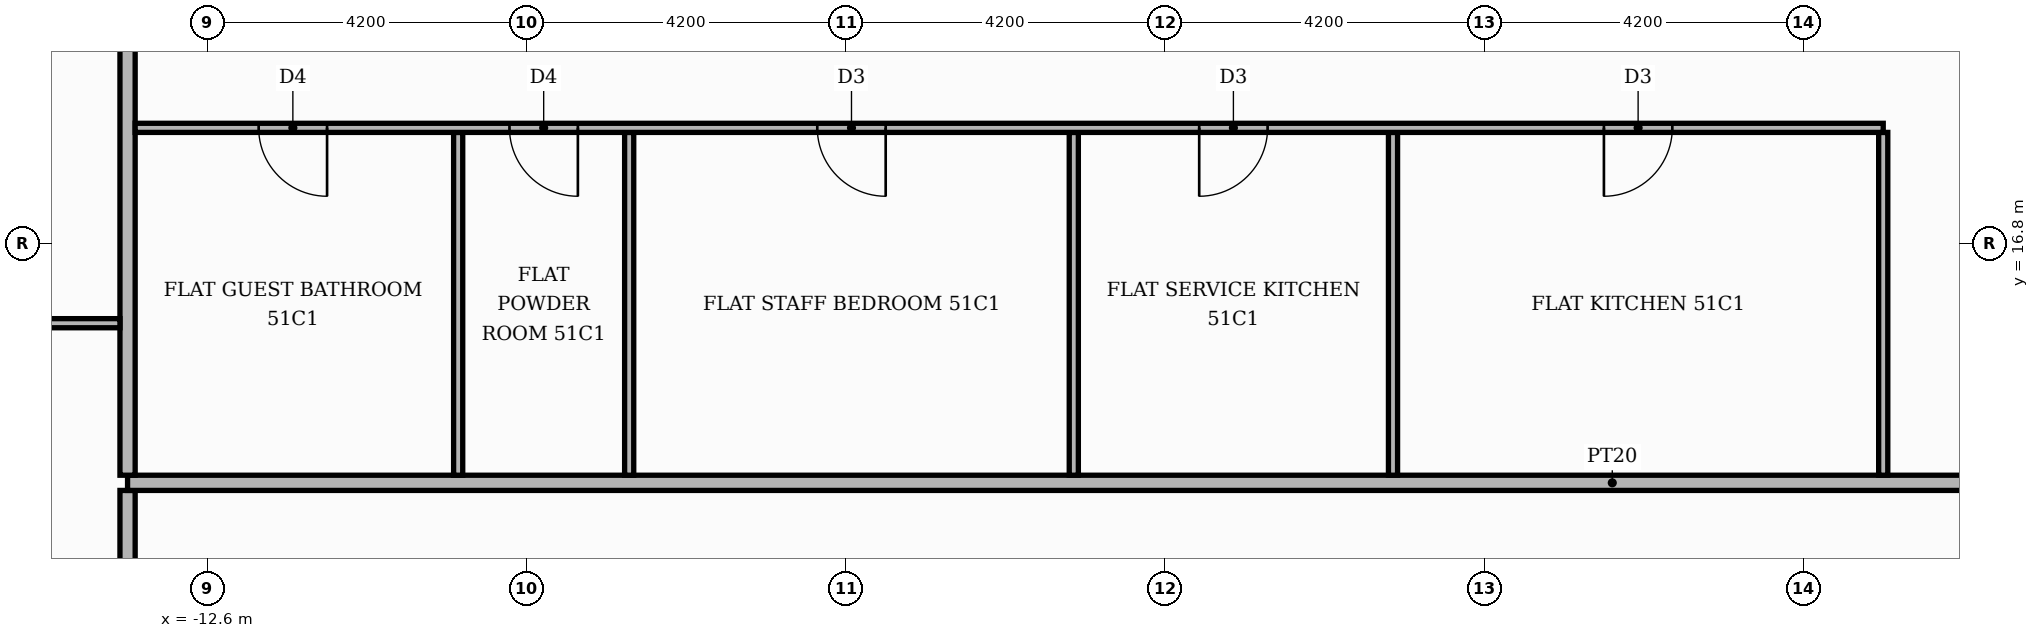
"""IFC4 building model, lengths in metres.
Left out: names, types, materials, properties, quantities, classifications, styles, units other than length and angle.
Written with IfcOpenShell. Run it as: python <this file> out.ifc"""

import sys

from ifc_helpers import new_model, si_unit, direction, frame, frame_2d, origin, place, context, subcontext, project, spatial, rectangle, extrude, element, fill, save


model = new_model("IFC4")
c1 = context("Model", 3, precision=1e-05, world=origin(), true_north=direction((0.0, 1.0)))
c2 = subcontext(c1, "Body", "Model", "MODEL_VIEW")
j1 = project(units=[si_unit("LENGTHUNIT", "METRE"), si_unit("PLANEANGLEUNIT", "RADIAN")], contexts=[c1])
p1 = place(None, origin())
s1 = spatial("IfcSite", under=j1, at=p1, CompositionType="ELEMENT")
p2 = place(p1, origin())
s2 = spatial("IfcBuilding", under=s1, at=p2, CompositionType="ELEMENT")
p3 = place(p2, frame((0.0, 0.0, 215.7)))
s3 = spatial("IfcBuildingStorey", under=s2, at=p3, CompositionType="ELEMENT", Elevation=215.7)
p4 = place(p3, frame((-13.65, 5.35, 0.0), z_axis=(0.0, 0.0, 1.0), x_axis=(0.0, 1.0, 0.0)))
e1 = element("IfcWall", 1, at=p4, inside=s3, PredefinedType="PARTITIONING", context=c2, shape_type="SweptSolid", body=[
    extrude(rectangle(XDim=8.2, YDim=0.2, at=frame_2d((4.1, 0.0))), origin(), (0.0, 0.0, 1.0), 3.48),
])
p5 = place(p4, frame((5.65, 0.0, 0.0)))
e2 = element("IfcOpeningElement", 2, at=p5, cuts=e1, PredefinedType="OPENING", context=c2, shape_type="SweptSolid", body=[
    extrude(rectangle(XDim=1.1, YDim=2.4, at=frame_2d((0.55, 1.2))), frame((0.0, 0.11, 0.0), z_axis=(0.0, -1.0, 0.0), x_axis=(1.0, 0.0, 0.0)), (0.0, 0.0, 1.0), 0.22),
])
p6 = place(p3, frame((-13.65, 13.65, 0.0), z_axis=(0.0, 0.0, 1.0), x_axis=(1.0, 0.0, 0.0)))
e3 = element("IfcWall", 3, at=p6, inside=s3, PredefinedType="PARTITIONING", context=c2, shape_type="SweptSolid", body=[
    extrude(rectangle(XDim=39.07, YDim=0.2, at=frame_2d((19.535, 0.0))), origin(), (0.0, 0.0, 1.0), 3.48),
])
p7 = place(p6, frame((24.65, 0.0, 0.0)))
e4 = element("IfcOpeningElement", 4, at=p7, cuts=e3, PredefinedType="OPENING", context=c2, shape_type="SweptSolid", body=[
    extrude(rectangle(XDim=1.1, YDim=2.4, at=frame_2d((0.55, 1.2))), frame((0.0, 0.11, 0.0), z_axis=(0.0, -1.0, 0.0), x_axis=(1.0, 0.0, 0.0)), (0.0, 0.0, 1.0), 0.22),
])
p8 = place(p3, frame((-13.65, 13.75, 0.0), z_axis=(0.0, 0.0, 1.0), x_axis=(0.0, 1.0, 0.0)))
e5 = element("IfcWall", 5, at=p8, inside=s3, PredefinedType="PARTITIONING", context=c2, shape_type="SweptSolid", body=[
    extrude(rectangle(XDim=11.67, YDim=0.2, at=frame_2d((5.835, 0.0))), origin(), (0.0, 0.0, 1.0), 3.48),
])
for number, where, z_axis, x_axis in (
    (6, (-9.3, 13.75, 0.0), (0.0, 0.0, 1.0), (0.0, 1.0, 0.0)),
    (7, (-7.05, 13.75, 0.0), (0.0, 0.0, 1.0), (0.0, 1.0, 0.0)),
    (8, (-1.2, 13.75, 0.0), (0.0, 0.0, 1.0), (0.0, 1.0, 0.0)),
    (9, (3.0, 13.75, 0.0), (0.0, 0.0, 1.0), (0.0, 1.0, 0.0)),
    (10, (9.45, 13.75, 0.0), (0.0, 0.0, 1.0), (0.0, 1.0, 0.0)),
):
    element("IfcWall", number, at=place(p3, frame(where, z_axis=z_axis, x_axis=x_axis)), inside=s3, PredefinedType="PARTITIONING", context=c2, shape_type="SweptSolid", body=[
        extrude(rectangle(XDim=4.51, YDim=0.12, at=frame_2d((2.255, 0.0))), origin(), (0.0, 0.0, 1.0), 3.48),
    ])
p9 = place(p3, frame((-20.12, 15.75, 0.0), z_axis=(0.0, 0.0, 1.0), x_axis=(1.0, 0.0, 0.0)))
e11 = element("IfcWall", 11, at=p9, inside=s3, PredefinedType="PARTITIONING", context=c2, shape_type="SweptSolid", body=[
    extrude(rectangle(XDim=6.37, YDim=0.12, at=frame_2d((3.185, 0.0))), origin(), (0.0, 0.0, 1.0), 3.48),
])
p10 = place(p9, frame((2.735, 0.0, 0.0)))
e12 = element("IfcOpeningElement", 12, at=p10, cuts=e11, PredefinedType="OPENING", context=c2, shape_type="SweptSolid", body=[
    extrude(rectangle(XDim=1.0, YDim=2.1, at=frame_2d((0.5, 1.05))), frame((0.0, 0.07, 0.0), z_axis=(0.0, -1.0, 0.0), x_axis=(1.0, 0.0, 0.0)), (0.0, 0.0, 1.0), 0.14),
])
p11 = place(p3, frame((-13.55, 18.32, 0.0), z_axis=(0.0, 0.0, 1.0), x_axis=(1.0, 0.0, 0.0)))
e13 = element("IfcWall", 13, at=p11, inside=s3, PredefinedType="PARTITIONING", context=c2, shape_type="SweptSolid", body=[
    extrude(rectangle(XDim=23.0, YDim=0.12, at=frame_2d((11.5, 0.0))), origin(), (0.0, 0.0, 1.0), 3.48),
])
p12 = place(p11, frame((19.325, 0.0, 0.0)))
e14 = element("IfcOpeningElement", 14, at=p12, cuts=e13, PredefinedType="OPENING", context=c2, shape_type="SweptSolid", body=[
    extrude(rectangle(XDim=0.9, YDim=2.1, at=frame_2d((0.45, 1.05))), frame((0.0, 0.07, 0.0), z_axis=(0.0, -1.0, 0.0), x_axis=(1.0, 0.0, 0.0)), (0.0, 0.0, 1.0), 0.14),
])
p13 = place(p11, frame((14.0, 0.0, 0.0)))
e15 = element("IfcOpeningElement", 15, at=p13, cuts=e13, PredefinedType="OPENING", context=c2, shape_type="SweptSolid", body=[
    extrude(rectangle(XDim=0.9, YDim=2.1, at=frame_2d((0.45, 1.05))), frame((0.0, 0.07, 0.0), z_axis=(0.0, -1.0, 0.0), x_axis=(1.0, 0.0, 0.0)), (0.0, 0.0, 1.0), 0.14),
])
p14 = place(p11, frame((8.975, 0.0, 0.0)))
e16 = element("IfcOpeningElement", 16, at=p14, cuts=e13, PredefinedType="OPENING", context=c2, shape_type="SweptSolid", body=[
    extrude(rectangle(XDim=0.9, YDim=2.1, at=frame_2d((0.45, 1.05))), frame((0.0, 0.07, 0.0), z_axis=(0.0, -1.0, 0.0), x_axis=(1.0, 0.0, 0.0)), (0.0, 0.0, 1.0), 0.14),
])
p15 = place(p11, frame((4.925, 0.0, 0.0)))
e17 = element("IfcOpeningElement", 17, at=p15, cuts=e13, PredefinedType="OPENING", context=c2, shape_type="SweptSolid", body=[
    extrude(rectangle(XDim=0.9, YDim=2.1, at=frame_2d((0.45, 1.05))), frame((0.0, 0.07, 0.0), z_axis=(0.0, -1.0, 0.0), x_axis=(1.0, 0.0, 0.0)), (0.0, 0.0, 1.0), 0.14),
])
p16 = place(p11, frame((1.625, 0.0, 0.0)))
e18 = element("IfcOpeningElement", 18, at=p16, cuts=e13, PredefinedType="OPENING", context=c2, shape_type="SweptSolid", body=[
    extrude(rectangle(XDim=0.9, YDim=2.1, at=frame_2d((0.45, 1.05))), frame((0.0, 0.07, 0.0), z_axis=(0.0, -1.0, 0.0), x_axis=(1.0, 0.0, 0.0)), (0.0, 0.0, 1.0), 0.14),
])
p17 = place(p12, frame((0.9, 0.0, 0.0), z_axis=(0.0, 0.0, 1.0), x_axis=(-1.0, 0.0, 0.0)))
e19 = element("IfcDoor", 19, at=p17, inside=s3, OperationType="SINGLE_SWING_LEFT", PredefinedType="DOOR", context=c2, shape_type="SweptSolid", body=[
    extrude(rectangle(XDim=0.9, YDim=2.1, at=frame_2d((0.45, 1.05))), frame((0.0, 0.025, 0.0), z_axis=(0.0, -1.0, 0.0), x_axis=(1.0, 0.0, 0.0)), (0.0, 0.0, 1.0), 0.05),
])
fill(e14, e19)
p18 = place(p13, frame((0.9, 0.0, 0.0), z_axis=(0.0, 0.0, 1.0), x_axis=(-1.0, 0.0, 0.0)))
e20 = element("IfcDoor", 20, at=p18, inside=s3, OperationType="SINGLE_SWING_LEFT", PredefinedType="DOOR", context=c2, shape_type="SweptSolid", body=[
    extrude(rectangle(XDim=0.9, YDim=2.1, at=frame_2d((0.45, 1.05))), frame((0.0, 0.025, 0.0), z_axis=(0.0, -1.0, 0.0), x_axis=(1.0, 0.0, 0.0)), (0.0, 0.0, 1.0), 0.05),
])
fill(e15, e20)
p19 = place(p14, frame((0.9, 0.0, 0.0), z_axis=(0.0, 0.0, 1.0), x_axis=(-1.0, 0.0, 0.0)))
e21 = element("IfcDoor", 21, at=p19, inside=s3, OperationType="SINGLE_SWING_RIGHT", PredefinedType="DOOR", context=c2, shape_type="SweptSolid", body=[
    extrude(rectangle(XDim=0.9, YDim=2.1, at=frame_2d((0.45, 1.05))), frame((0.0, 0.025, 0.0), z_axis=(0.0, -1.0, 0.0), x_axis=(1.0, 0.0, 0.0)), (0.0, 0.0, 1.0), 0.05),
])
fill(e16, e21)
p20 = place(p15, frame((0.9, 0.0, 0.0), z_axis=(0.0, 0.0, 1.0), x_axis=(-1.0, 0.0, 0.0)))
e22 = element("IfcDoor", 22, at=p20, inside=s3, OperationType="SINGLE_SWING_RIGHT", PredefinedType="DOOR", context=c2, shape_type="SweptSolid", body=[
    extrude(rectangle(XDim=0.9, YDim=2.1, at=frame_2d((0.45, 1.05))), frame((0.0, 0.025, 0.0), z_axis=(0.0, -1.0, 0.0), x_axis=(1.0, 0.0, 0.0)), (0.0, 0.0, 1.0), 0.05),
])
fill(e17, e22)
p21 = place(p16, frame((0.9, 0.0, 0.0), z_axis=(0.0, 0.0, 1.0), x_axis=(-1.0, 0.0, 0.0)))
e23 = element("IfcDoor", 23, at=p21, inside=s3, OperationType="SINGLE_SWING_RIGHT", PredefinedType="DOOR", context=c2, shape_type="SweptSolid", body=[
    extrude(rectangle(XDim=0.9, YDim=2.1, at=frame_2d((0.45, 1.05))), frame((0.0, 0.025, 0.0), z_axis=(0.0, -1.0, 0.0), x_axis=(1.0, 0.0, 0.0)), (0.0, 0.0, 1.0), 0.05),
])
fill(e18, e23)
save(model, sys.argv[1])
